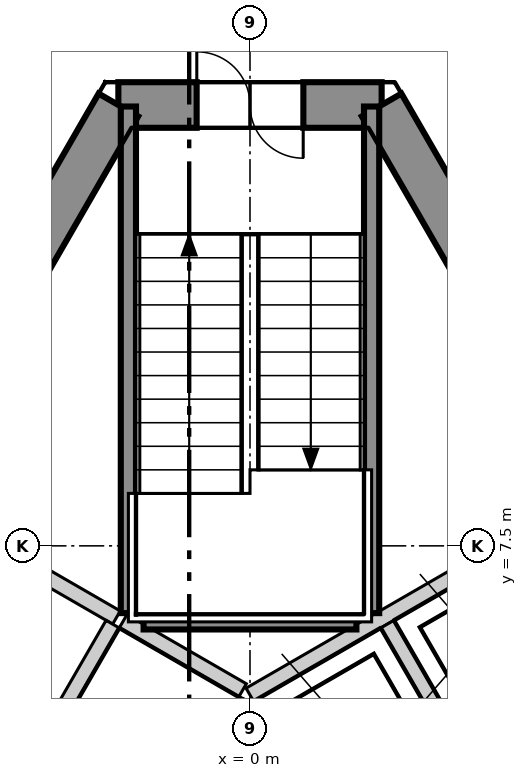
"""IFC4 building model, lengths in metres.
Left out: names, types, materials, properties, quantities, classifications, styles, units other than length and angle.
Written with IfcOpenShell. Run it as: python <this file> out.ifc"""

import sys

from ifc_helpers import new_model, si_unit, direction, frame, frame_2d, origin, place, context, subcontext, project, spatial, polyline, rectangle, outline, extrude, element, fill, save


model = new_model("IFC4")
c1 = context("Model", 3, precision=1e-05, world=origin(), true_north=direction((0.0, 1.0)))
c2 = subcontext(c1, "Body", "Model", "MODEL_VIEW")
j1 = project(units=[si_unit("LENGTHUNIT", "METRE"), si_unit("PLANEANGLEUNIT", "RADIAN")], contexts=[c1])
p1 = place(None, origin())
s1 = spatial("IfcSite", under=j1, at=p1, CompositionType="ELEMENT")
p2 = place(p1, origin())
s2 = spatial("IfcBuilding", under=s1, at=p2, CompositionType="ELEMENT")
p3 = place(p2, frame((0.0, 0.0, 279.1)))
s3 = spatial("IfcBuildingStorey", under=s2, at=p3, CompositionType="ELEMENT", Elevation=279.1)
p4 = place(p3, frame((1.732, 13.3, -0.3), z_axis=(0.0, 0.0, 1.0), x_axis=(-1.0, 0.0, 0.0)))
e1 = element("IfcWall", 1, at=p4, inside=s3, PredefinedType="SHEAR", context=c2, shape_type="SweptSolid", body=[
    extrude(outline(polyline([(-0.173, -0.3), (1.732, -0.3), (3.637, -0.3), (3.291, 0.3), (1.732, 0.3), (0.173, 0.3), (-0.173, -0.3)])), origin(), (0.0, 0.0, 1.0), 3.6),
])
p5 = place(p4, frame((1.032, 0.0, 0.3)))
e2 = element("IfcOpeningElement", 2, at=p5, cuts=e1, PredefinedType="OPENING", context=c2, shape_type="SweptSolid", body=[
    extrude(rectangle(XDim=1.4, YDim=2.1, at=frame_2d((0.7, 1.05))), frame((0.0, 0.31, 0.0), z_axis=(0.0, -1.0, 0.0), x_axis=(1.0, 0.0, 0.0)), (0.0, 0.0, 1.0), 0.62),
])
p6 = place(p3, frame((-1.732, 13.3, -0.3), z_axis=(0.0, 0.0, 1.0), x_axis=(-0.500000539815, -0.866025092122, 0.0)))
e3 = element("IfcWall", 3, at=p6, inside=s3, PredefinedType="SHEAR", context=c2, shape_type="SweptSolid", body=[
    extrude(outline(polyline([(-0.173, -0.3), (1.795, -0.3), (3.763, -0.3), (5.732, -0.3), (7.7, -0.3), (9.668, -0.301), (11.637, -0.301), (13.605, -0.301), (15.573, -0.301), (17.542, -0.301), (19.51, -0.301), (21.478, -0.301), (21.131, 0.3), (19.226, 0.3), (17.321, 0.3), (15.415, 0.3), (13.51, 0.3), (11.605, 0.3), (9.699, 0.3), (7.794, 0.3), (5.889, 0.3), (3.984, 0.3), (2.078, 0.3), (0.173, 0.3), (-0.173, -0.3)])), origin(), (0.0, 0.0, 1.0), 3.6),
])
p7 = place(p6, frame((10.102, 0.0, 0.3)))
e4 = element("IfcOpeningElement", 4, at=p7, cuts=e3, PredefinedType="OPENING", context=c2, shape_type="SweptSolid", body=[
    extrude(rectangle(XDim=1.1, YDim=2.1, at=frame_2d((0.55, 1.05))), frame((0.0, 0.31, 0.0), z_axis=(0.0, -1.0, 0.0), x_axis=(1.0, 0.0, 0.0)), (0.0, 0.0, 1.0), 0.621),
])
p8 = place(p6, frame((15.627, 0.0, 0.3)))
e5 = element("IfcOpeningElement", 5, at=p8, cuts=e3, PredefinedType="OPENING", context=c2, shape_type="SweptSolid", body=[
    extrude(rectangle(XDim=0.9, YDim=2.1, at=frame_2d((0.45, 1.05))), frame((0.0, 0.31, 0.0), z_axis=(0.0, -1.0, 0.0), x_axis=(1.0, 0.0, 0.0)), (0.0, 0.0, 1.0), 0.621),
])
p9 = place(p3, frame((12.384, -5.15, -0.3), z_axis=(0.0, 0.0, 1.0), x_axis=(-0.500000539815, 0.866025092122, 0.0)))
e6 = element("IfcWall", 6, at=p9, inside=s3, PredefinedType="SHEAR", context=c2, shape_type="SweptSolid", body=[
    extrude(outline(polyline([(-0.173, -0.301), (1.795, -0.301), (3.763, -0.301), (5.731, -0.301), (7.7, -0.301), (9.668, -0.301), (11.636, -0.301), (13.604, -0.3), (15.573, -0.3), (17.541, -0.3), (19.509, -0.3), (21.477, -0.3), (21.131, 0.3), (19.226, 0.3), (17.321, 0.3), (15.415, 0.3), (13.51, 0.3), (11.605, 0.3), (9.699, 0.3), (7.794, 0.3), (5.889, 0.3), (3.984, 0.3), (2.078, 0.3), (0.173, 0.3), (-0.173, -0.301)])), origin(), (0.0, 0.0, 1.0), 3.6),
])
p10 = place(p9, frame((16.378, 0.0, 0.3)))
e7 = element("IfcOpeningElement", 7, at=p10, cuts=e6, PredefinedType="OPENING", context=c2, shape_type="SweptSolid", body=[
    extrude(rectangle(XDim=0.9, YDim=2.1, at=frame_2d((0.45, 1.05))), frame((0.0, 0.31, 0.0), z_axis=(0.0, -1.0, 0.0), x_axis=(1.0, 0.0, 0.0)), (0.0, 0.0, 1.0), 0.621),
])
p11 = place(p9, frame((3.976, 0.0, 0.3)))
e8 = element("IfcOpeningElement", 8, at=p11, cuts=e6, PredefinedType="OPENING", context=c2, shape_type="SweptSolid", body=[
    extrude(rectangle(XDim=1.0, YDim=2.1, at=frame_2d((0.5, 1.05))), frame((0.0, 0.31, 0.0), z_axis=(0.0, -1.0, 0.0), x_axis=(1.0, 0.0, 0.0)), (0.0, 0.0, 1.0), 0.621),
])
p12 = place(p3, frame((-2.536, 28.316, 0.0), z_axis=(0.0, 0.0, 1.0), x_axis=(-0.500006870765, -0.86602143691, 0.0)))
e9 = element("IfcWall", 9, at=p12, inside=s3, PredefinedType="ELEMENTEDWALL", context=c2, shape_type="SweptSolid", body=[
    extrude(rectangle(XDim=46.49, YDim=0.2, at=frame_2d((23.245, 0.0))), origin(), (0.0, 0.0, 1.0), 3.3),
])
p13 = place(p12, frame((2.196, 0.0, 0.9)))
e10 = element("IfcOpeningElement", 10, at=p13, cuts=e9, PredefinedType="OPENING", context=c2, shape_type="SweptSolid", body=[
    extrude(rectangle(XDim=3.7, YDim=2.2, at=frame_2d((1.85, 1.1))), frame((0.0, 0.11, 0.0), z_axis=(0.0, -1.0, 0.0), x_axis=(1.0, 0.0, 0.0)), (0.0, 0.0, 1.0), 0.22),
])
p14 = place(p12, frame((7.684, 0.0, 0.9)))
e11 = element("IfcOpeningElement", 11, at=p14, cuts=e9, PredefinedType="OPENING", context=c2, shape_type="SweptSolid", body=[
    extrude(rectangle(XDim=3.7, YDim=2.2, at=frame_2d((1.85, 1.1))), frame((0.0, 0.11, 0.0), z_axis=(0.0, -1.0, 0.0), x_axis=(1.0, 0.0, 0.0)), (0.0, 0.0, 1.0), 0.22),
])
p15 = place(p12, frame((13.172, 0.0, 0.9)))
e12 = element("IfcOpeningElement", 12, at=p15, cuts=e9, PredefinedType="OPENING", context=c2, shape_type="SweptSolid", body=[
    extrude(rectangle(XDim=3.7, YDim=2.2, at=frame_2d((1.85, 1.1))), frame((0.0, 0.11, 0.0), z_axis=(0.0, -1.0, 0.0), x_axis=(1.0, 0.0, 0.0)), (0.0, 0.0, 1.0), 0.22),
])
p16 = place(p12, frame((18.66, 0.0, 0.9)))
e13 = element("IfcOpeningElement", 13, at=p16, cuts=e9, PredefinedType="OPENING", context=c2, shape_type="SweptSolid", body=[
    extrude(rectangle(XDim=3.7, YDim=2.2, at=frame_2d((1.85, 1.1))), frame((0.0, 0.11, 0.0), z_axis=(0.0, -1.0, 0.0), x_axis=(1.0, 0.0, 0.0)), (0.0, 0.0, 1.0), 0.22),
])
p17 = place(p12, frame((24.148, 0.0, 0.9)))
e14 = element("IfcOpeningElement", 14, at=p17, cuts=e9, PredefinedType="OPENING", context=c2, shape_type="SweptSolid", body=[
    extrude(rectangle(XDim=3.7, YDim=2.2, at=frame_2d((1.85, 1.1))), frame((0.0, 0.11, 0.0), z_axis=(0.0, -1.0, 0.0), x_axis=(1.0, 0.0, 0.0)), (0.0, 0.0, 1.0), 0.22),
])
p18 = place(p12, frame((29.636, 0.0, 0.9)))
e15 = element("IfcOpeningElement", 15, at=p18, cuts=e9, PredefinedType="OPENING", context=c2, shape_type="SweptSolid", body=[
    extrude(rectangle(XDim=3.7, YDim=2.2, at=frame_2d((1.85, 1.1))), frame((0.0, 0.11, 0.0), z_axis=(0.0, -1.0, 0.0), x_axis=(1.0, 0.0, 0.0)), (0.0, 0.0, 1.0), 0.22),
])
p19 = place(p12, frame((35.124, 0.0, 0.9)))
e16 = element("IfcOpeningElement", 16, at=p19, cuts=e9, PredefinedType="OPENING", context=c2, shape_type="SweptSolid", body=[
    extrude(rectangle(XDim=3.7, YDim=2.2, at=frame_2d((1.85, 1.1))), frame((0.0, 0.11, 0.0), z_axis=(0.0, -1.0, 0.0), x_axis=(1.0, 0.0, 0.0)), (0.0, 0.0, 1.0), 0.22),
])
p20 = place(p12, frame((40.612, 0.0, 0.9)))
e17 = element("IfcOpeningElement", 17, at=p20, cuts=e9, PredefinedType="OPENING", context=c2, shape_type="SweptSolid", body=[
    extrude(rectangle(XDim=3.7, YDim=2.2, at=frame_2d((1.85, 1.1))), frame((0.0, 0.11, 0.0), z_axis=(0.0, -1.0, 0.0), x_axis=(1.0, 0.0, 0.0)), (0.0, 0.0, 1.0), 0.22),
])
p21 = place(p3, frame((25.791, -11.962, 0.0), z_axis=(0.0, 0.0, 1.0), x_axis=(-0.500006870765, 0.86602143691, 0.0)))
e18 = element("IfcWall", 18, at=p21, inside=s3, PredefinedType="ELEMENTEDWALL", context=c2, shape_type="SweptSolid", body=[
    extrude(rectangle(XDim=46.49, YDim=0.2, at=frame_2d((23.245, 0.0))), origin(), (0.0, 0.0, 1.0), 3.3),
])
p22 = place(p21, frame((2.197, 0.0, 0.9)))
e19 = element("IfcOpeningElement", 19, at=p22, cuts=e18, PredefinedType="OPENING", context=c2, shape_type="SweptSolid", body=[
    extrude(rectangle(XDim=3.7, YDim=2.2, at=frame_2d((1.85, 1.1))), frame((0.0, 0.11, 0.0), z_axis=(0.0, -1.0, 0.0), x_axis=(1.0, 0.0, 0.0)), (0.0, 0.0, 1.0), 0.22),
])
p23 = place(p21, frame((7.685, 0.0, 0.9)))
e20 = element("IfcOpeningElement", 20, at=p23, cuts=e18, PredefinedType="OPENING", context=c2, shape_type="SweptSolid", body=[
    extrude(rectangle(XDim=3.7, YDim=2.2, at=frame_2d((1.85, 1.1))), frame((0.0, 0.11, 0.0), z_axis=(0.0, -1.0, 0.0), x_axis=(1.0, 0.0, 0.0)), (0.0, 0.0, 1.0), 0.22),
])
p24 = place(p21, frame((13.173, 0.0, 0.9)))
e21 = element("IfcOpeningElement", 21, at=p24, cuts=e18, PredefinedType="OPENING", context=c2, shape_type="SweptSolid", body=[
    extrude(rectangle(XDim=3.7, YDim=2.2, at=frame_2d((1.85, 1.1))), frame((0.0, 0.11, 0.0), z_axis=(0.0, -1.0, 0.0), x_axis=(1.0, 0.0, 0.0)), (0.0, 0.0, 1.0), 0.22),
])
p25 = place(p21, frame((18.661, 0.0, 0.9)))
e22 = element("IfcOpeningElement", 22, at=p25, cuts=e18, PredefinedType="OPENING", context=c2, shape_type="SweptSolid", body=[
    extrude(rectangle(XDim=3.7, YDim=2.2, at=frame_2d((1.85, 1.1))), frame((0.0, 0.11, 0.0), z_axis=(0.0, -1.0, 0.0), x_axis=(1.0, 0.0, 0.0)), (0.0, 0.0, 1.0), 0.22),
])
p26 = place(p21, frame((24.149, 0.0, 0.9)))
e23 = element("IfcOpeningElement", 23, at=p26, cuts=e18, PredefinedType="OPENING", context=c2, shape_type="SweptSolid", body=[
    extrude(rectangle(XDim=3.7, YDim=2.2, at=frame_2d((1.85, 1.1))), frame((0.0, 0.11, 0.0), z_axis=(0.0, -1.0, 0.0), x_axis=(1.0, 0.0, 0.0)), (0.0, 0.0, 1.0), 0.22),
])
p27 = place(p21, frame((29.637, 0.0, 0.9)))
e24 = element("IfcOpeningElement", 24, at=p27, cuts=e18, PredefinedType="OPENING", context=c2, shape_type="SweptSolid", body=[
    extrude(rectangle(XDim=3.7, YDim=2.2, at=frame_2d((1.85, 1.1))), frame((0.0, 0.11, 0.0), z_axis=(0.0, -1.0, 0.0), x_axis=(1.0, 0.0, 0.0)), (0.0, 0.0, 1.0), 0.22),
])
p28 = place(p21, frame((35.125, 0.0, 0.9)))
e25 = element("IfcOpeningElement", 25, at=p28, cuts=e18, PredefinedType="OPENING", context=c2, shape_type="SweptSolid", body=[
    extrude(rectangle(XDim=3.7, YDim=2.2, at=frame_2d((1.85, 1.1))), frame((0.0, 0.11, 0.0), z_axis=(0.0, -1.0, 0.0), x_axis=(1.0, 0.0, 0.0)), (0.0, 0.0, 1.0), 0.22),
])
p29 = place(p21, frame((40.613, 0.0, 0.9)))
e26 = element("IfcOpeningElement", 26, at=p29, cuts=e18, PredefinedType="OPENING", context=c2, shape_type="SweptSolid", body=[
    extrude(rectangle(XDim=3.7, YDim=2.2, at=frame_2d((1.85, 1.1))), frame((0.0, 0.11, 0.0), z_axis=(0.0, -1.0, 0.0), x_axis=(1.0, 0.0, 0.0)), (0.0, 0.0, 1.0), 0.22),
])
p30 = place(p3, frame((-17.678, -10.119, 0.0), z_axis=(0.0, 0.0, 1.0), x_axis=(0.500003190174, 0.866023561929, 0.0)))
e27 = element("IfcWall", 27, at=p30, inside=s3, PredefinedType="PARTITIONING", context=c2, shape_type="SweptSolid", body=[
    extrude(rectangle(XDim=35.356, YDim=0.15, at=frame_2d((17.678, 0.0))), origin(), (0.0, 0.0, 1.0), 3.3),
])
p31 = place(p30, frame((28.706, 0.0, 0.0)))
e28 = element("IfcOpeningElement", 28, at=p31, cuts=e27, PredefinedType="OPENING", context=c2, shape_type="SweptSolid", body=[
    extrude(rectangle(XDim=1.0, YDim=2.1, at=frame_2d((0.5, 1.05))), frame((0.0, 0.085, 0.0), z_axis=(0.0, -1.0, 0.0), x_axis=(1.0, 0.0, 0.0)), (0.0, 0.0, 1.0), 0.17),
])
p32 = place(p30, frame((18.74, 0.0, 0.0)))
e29 = element("IfcOpeningElement", 29, at=p32, cuts=e27, PredefinedType="OPENING", context=c2, shape_type="SweptSolid", body=[
    extrude(rectangle(XDim=1.0, YDim=2.1, at=frame_2d((0.5, 1.05))), frame((0.0, 0.085, 0.0), z_axis=(0.0, -1.0, 0.0), x_axis=(1.0, 0.0, 0.0)), (0.0, 0.0, 1.0), 0.17),
])
p33 = place(p30, frame((9.352, 0.0, 0.0)))
e30 = element("IfcOpeningElement", 30, at=p33, cuts=e27, PredefinedType="OPENING", context=c2, shape_type="SweptSolid", body=[
    extrude(rectangle(XDim=1.0, YDim=2.1, at=frame_2d((0.5, 1.05))), frame((0.0, 0.085, 0.0), z_axis=(0.0, -1.0, 0.0), x_axis=(1.0, 0.0, 0.0)), (0.0, 0.0, 1.0), 0.17),
])
p34 = place(p30, frame((2.777, 0.0, 0.0)))
e31 = element("IfcOpeningElement", 31, at=p34, cuts=e27, PredefinedType="OPENING", context=c2, shape_type="SweptSolid", body=[
    extrude(rectangle(XDim=1.0, YDim=2.1, at=frame_2d((0.5, 1.05))), frame((0.0, 0.085, 0.0), z_axis=(0.0, -1.0, 0.0), x_axis=(1.0, 0.0, 0.0)), (0.0, 0.0, 1.0), 0.17),
])
p35 = place(p3, frame((0.075, 20.37, 0.0), z_axis=(0.0, 0.0, 1.0), x_axis=(0.500003985697, -0.866023102629, 0.0)))
e32 = element("IfcWall", 32, at=p35, inside=s3, PredefinedType="PARTITIONING", context=c2, shape_type="SweptSolid", body=[
    extrude(rectangle(XDim=35.206, YDim=0.15, at=frame_2d((17.603, 0.0))), origin(), (0.0, 0.0, 1.0), 3.3),
])
p36 = place(p35, frame((31.506, 0.0, 0.0)))
e33 = element("IfcOpeningElement", 33, at=p36, cuts=e32, PredefinedType="OPENING", context=c2, shape_type="SweptSolid", body=[
    extrude(rectangle(XDim=1.0, YDim=2.1, at=frame_2d((0.5, 1.05))), frame((0.0, 0.085, 0.0), z_axis=(0.0, -1.0, 0.0), x_axis=(1.0, 0.0, 0.0)), (0.0, 0.0, 1.0), 0.17),
])
p37 = place(p35, frame((26.529, 0.0, 0.0)))
e34 = element("IfcOpeningElement", 34, at=p37, cuts=e32, PredefinedType="OPENING", context=c2, shape_type="SweptSolid", body=[
    extrude(rectangle(XDim=1.0, YDim=2.1, at=frame_2d((0.5, 1.05))), frame((0.0, 0.085, 0.0), z_axis=(0.0, -1.0, 0.0), x_axis=(1.0, 0.0, 0.0)), (0.0, 0.0, 1.0), 0.17),
])
p38 = place(p35, frame((19.442, 0.0, 0.0)))
e35 = element("IfcOpeningElement", 35, at=p38, cuts=e32, PredefinedType="OPENING", context=c2, shape_type="SweptSolid", body=[
    extrude(rectangle(XDim=1.0, YDim=2.1, at=frame_2d((0.5, 1.05))), frame((0.0, 0.085, 0.0), z_axis=(0.0, -1.0, 0.0), x_axis=(1.0, 0.0, 0.0)), (0.0, 0.0, 1.0), 0.17),
])
p39 = place(p35, frame((8.254, 0.0, 0.0)))
e36 = element("IfcOpeningElement", 36, at=p39, cuts=e32, PredefinedType="OPENING", context=c2, shape_type="SweptSolid", body=[
    extrude(rectangle(XDim=1.0, YDim=2.1, at=frame_2d((0.5, 1.05))), frame((0.0, 0.085, 0.0), z_axis=(0.0, -1.0, 0.0), x_axis=(1.0, 0.0, 0.0)), (0.0, 0.0, 1.0), 0.17),
])
p40 = place(p35, frame((13.754, 0.0, 0.0)))
e37 = element("IfcOpeningElement", 37, at=p40, cuts=e32, PredefinedType="OPENING", context=c2, shape_type="SweptSolid", body=[
    extrude(rectangle(XDim=0.9, YDim=2.1, at=frame_2d((0.45, 1.05))), frame((0.0, 0.085, 0.0), z_axis=(0.0, -1.0, 0.0), x_axis=(1.0, 0.0, 0.0)), (0.0, 0.0, 1.0), 0.17),
])
p41 = place(p35, frame((11.554, 0.0, 0.0)))
e38 = element("IfcOpeningElement", 38, at=p41, cuts=e32, PredefinedType="OPENING", context=c2, shape_type="SweptSolid", body=[
    extrude(rectangle(XDim=0.9, YDim=2.1, at=frame_2d((0.45, 1.05))), frame((0.0, 0.085, 0.0), z_axis=(0.0, -1.0, 0.0), x_axis=(1.0, 0.0, 0.0)), (0.0, 0.0, 1.0), 0.17),
])
p42 = place(p35, frame((2.777, 0.0, 0.0)))
e39 = element("IfcOpeningElement", 39, at=p42, cuts=e32, PredefinedType="OPENING", context=c2, shape_type="SweptSolid", body=[
    extrude(rectangle(XDim=1.0, YDim=2.1, at=frame_2d((0.5, 1.05))), frame((0.0, 0.085, 0.0), z_axis=(0.0, -1.0, 0.0), x_axis=(1.0, 0.0, 0.0)), (0.0, 0.0, 1.0), 0.17),
])
p43 = place(p3, frame((-0.002, 5.541, 0.0), z_axis=(0.0, 0.0, 1.0), x_axis=(0.86600155993, 0.500041296494, 0.0)))
e40 = element("IfcWall", 40, at=p43, inside=s3, PredefinedType="SOLIDWALL", context=c2, shape_type="SweptSolid", body=[
    extrude(rectangle(XDim=4.132, YDim=0.2, at=frame_2d((2.066, 0.0))), origin(), (0.0, 0.0, 1.0), 3.3),
])
p44 = place(p3, frame((1.578, 2.874, 0.0), z_axis=(0.0, 0.0, 1.0), x_axis=(0.866045911672, 0.499964477614, 0.0)))
e41 = element("IfcWall", 41, at=p44, inside=s3, PredefinedType="SOLIDWALL", context=c2, shape_type="SweptSolid", body=[
    extrude(rectangle(XDim=5.327, YDim=0.2, at=frame_2d((2.663, 0.0))), origin(), (0.0, 0.0, 1.0), 3.3),
])
p45 = place(p44, frame((2.496, 0.0, 0.0)))
e42 = element("IfcOpeningElement", 42, at=p45, cuts=e41, PredefinedType="OPENING", context=c2, shape_type="SweptSolid", body=[
    extrude(rectangle(XDim=1.1, YDim=2.1, at=frame_2d((0.55, 1.05))), frame((0.0, 0.11, 0.0), z_axis=(0.0, -1.0, 0.0), x_axis=(1.0, 0.0, 0.0)), (0.0, 0.0, 1.0), 0.22),
])
p46 = place(p3, frame((1.807, 6.47, 0.0), z_axis=(0.0, 0.0, 1.0), x_axis=(0.50012328804, -0.865954211699, 0.0)))
e43 = element("IfcWall", 43, at=p46, inside=s3, PredefinedType="SOLIDWALL", context=c2, shape_type="SweptSolid", body=[
    extrude(rectangle(XDim=2.9, YDim=0.2, at=frame_2d((1.45, 0.0))), origin(), (0.0, 0.0, 1.0), 3.3),
])
p47 = place(p3, frame((-3.489, 7.557, 0.0), z_axis=(0.0, 0.0, 1.0), x_axis=(0.866010750942, -0.50002537861, 0.0)))
e44 = element("IfcWall", 44, at=p47, inside=s3, PredefinedType="SOLIDWALL", context=c2, shape_type="SweptSolid", body=[
    extrude(rectangle(XDim=2.0, YDim=0.2, at=frame_2d((1.0, 0.0))), origin(), (0.0, 0.0, 1.0), 3.3),
])
p48 = place(p3, frame((-3.257, 3.959, 0.0), z_axis=(0.0, 0.0, 1.0), x_axis=(0.50012328804, 0.865954211699, 0.0)))
e45 = element("IfcWall", 45, at=p48, inside=s3, PredefinedType="SOLIDWALL", context=c2, shape_type="SweptSolid", body=[
    extrude(rectangle(XDim=2.9, YDim=0.2, at=frame_2d((1.45, 0.0))), origin(), (0.0, 0.0, 1.0), 3.3),
])
p49 = place(p3, frame((-1.67, 6.507, 0.0), z_axis=(0.0, 0.0, 1.0), x_axis=(0.865941441609, -0.500145398563, 0.0)))
e46 = element("IfcWall", 46, at=p49, inside=s3, PredefinedType="SOLIDWALL", context=c2, shape_type="SweptSolid", body=[
    extrude(rectangle(XDim=1.815, YDim=0.2, at=frame_2d((0.908, 0.0))), origin(), (0.0, 0.0, 1.0), 3.3),
])
p50 = place(p3, frame((1.6, 6.615, 0.0), z_axis=(0.0, 0.0, 1.0), x_axis=(0.0, 1.0, 0.0)))
e47 = element("IfcWall", 47, at=p50, inside=s3, PredefinedType="SOLIDWALL", context=c2, shape_type="SweptSolid", body=[
    extrude(rectangle(XDim=6.665, YDim=0.2, at=frame_2d((3.333, 0.0))), origin(), (0.0, 0.0, 1.0), 3.3),
])
p51 = place(p3, frame((-1.4, 6.5, 0.0), z_axis=(0.0, 0.0, 1.0), x_axis=(1.0, 0.0, 0.0)))
e48 = element("IfcWall", 48, at=p51, inside=s3, PredefinedType="SOLIDWALL", context=c2, shape_type="SweptSolid", body=[
    extrude(rectangle(XDim=2.8, YDim=0.2, at=frame_2d((1.4, 0.0))), origin(), (0.0, 0.0, 1.0), 3.3),
])
p52 = place(p3, frame((-1.6, 6.615, 0.0), z_axis=(0.0, 0.0, 1.0), x_axis=(0.0, 1.0, 0.0)))
e49 = element("IfcWall", 49, at=p52, inside=s3, PredefinedType="SOLIDWALL", context=c2, shape_type="SweptSolid", body=[
    extrude(rectangle(XDim=6.665, YDim=0.2, at=frame_2d((3.333, 0.0))), origin(), (0.0, 0.0, 1.0), 3.3),
])
p53 = place(p5, origin())
e50 = element("IfcDoor", 50, at=p53, inside=s3, OperationType="DOUBLE_DOOR_SINGLE_SWING", PredefinedType="DOOR", context=c2, shape_type="SweptSolid", body=[
    extrude(rectangle(XDim=1.4, YDim=2.1, at=frame_2d((0.7, 1.05))), frame((0.0, 0.025, 0.0), z_axis=(0.0, -1.0, 0.0), x_axis=(1.0, 0.0, 0.0)), (0.0, 0.0, 1.0), 0.05),
])
fill(e2, e50)
save(model, sys.argv[1])
